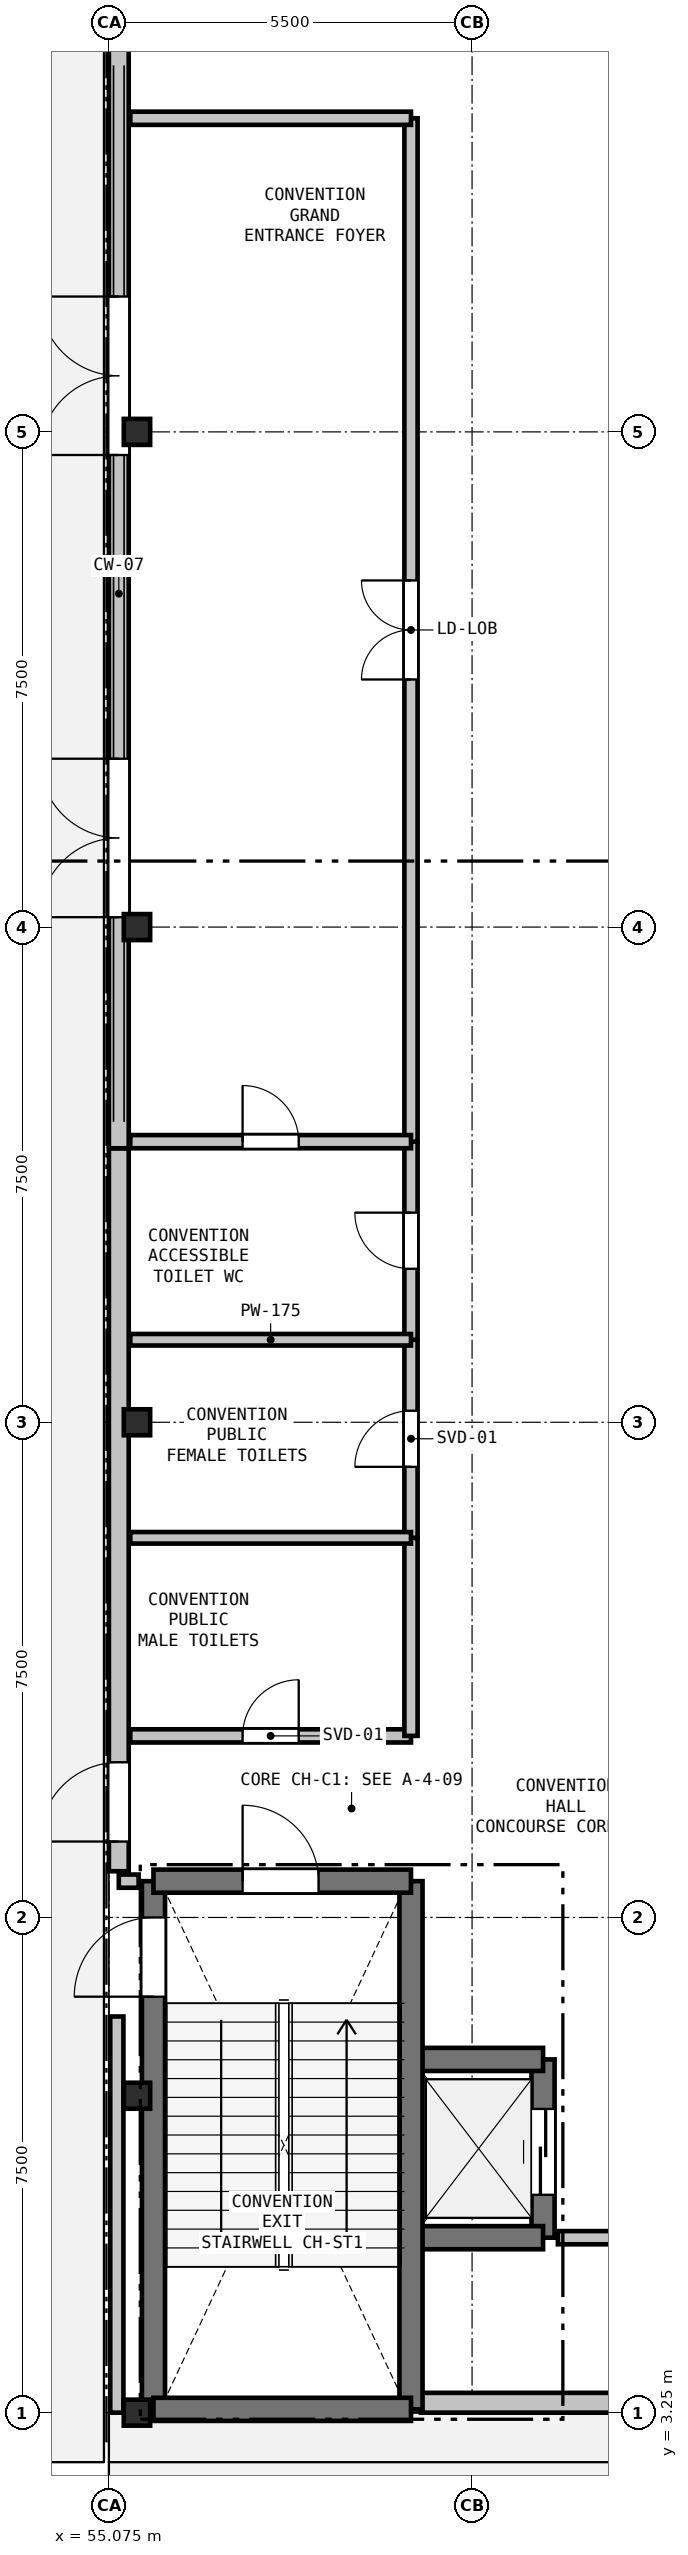
"""IFC4 building model, lengths in metres.
Left out: names, types, materials, properties, quantities, classifications, styles, units other than length and angle.
Written with IfcOpenShell. Run it as: python <this file> out.ifc"""

import sys

from ifc_helpers import new_model, si_unit, direction, frame, frame_2d, origin, origin_2d, place, context, subcontext, project, spatial, rectangle, i_section, extrude, element, fill, save


model = new_model("IFC4")
c1 = context("Model", 3, precision=1e-05, world=origin(), true_north=direction((0.0, 1.0)))
c2 = subcontext(c1, "Body", "Model", "MODEL_VIEW")
j1 = project(units=[si_unit("LENGTHUNIT", "METRE"), si_unit("PLANEANGLEUNIT", "RADIAN")], contexts=[c1])
p1 = place(None, origin())
s1 = spatial("IfcSite", under=j1, at=p1, CompositionType="ELEMENT")
p2 = place(p1, origin())
s2 = spatial("IfcBuilding", under=s1, at=p2, CompositionType="ELEMENT")
p3 = place(p2, origin())
s3 = spatial("IfcBuildingStorey", under=s2, at=p3, CompositionType="ELEMENT", Elevation=0.0)
for number, where, z_axis, x_axis in (
    (1, (55.5, 3.25, 0.0), (0.0, 0.0, 1.0), (1.0, 0.0, 0.0)),
    (2, (55.5, 8.05, 0.0), (0.0, 0.0, 1.0), (1.0, 0.0, 0.0)),
    (3, (55.5, 18.25, 0.0), (0.0, 0.0, 1.0), (1.0, 0.0, 0.0)),
    (4, (55.5, 25.75, 0.0), (0.0, 0.0, 1.0), (1.0, 0.0, 0.0)),
    (5, (55.5, 33.25, 0.0), (0.0, 0.0, 1.0), (1.0, 0.0, 0.0)),
):
    element("IfcColumn", number, at=place(p3, frame(where, z_axis=z_axis, x_axis=x_axis)), inside=s3, PredefinedType="COLUMN", context=c2, shape_type="SweptSolid", body=[
        extrude(i_section(OverallWidth=0.399, OverallDepth=0.394, WebThickness=0.023, FlangeThickness=0.037, at=origin_2d()), origin(), (0.0, 0.0, 1.0), 5.1),
    ])
p4 = place(p3, frame((55.195, 3.25, 0.0), z_axis=(0.0, 0.0, 1.0), x_axis=(0.0, 1.0, 0.0)))
e6 = element("IfcWall", 6, at=p4, inside=s3, PredefinedType="PARAPET", context=c2, shape_type="SweptSolid", body=[
    extrude(rectangle(XDim=6.0, YDim=0.2, at=frame_2d((3.0, 0.0))), origin(), (0.0, 0.0, 1.0), 4.39),
])
p5 = place(p3, frame((55.225, 11.45, 0.0), z_axis=(0.0, 0.0, 1.0), x_axis=(0.0, 1.0, 0.0)))
e7 = element("IfcWall", 7, at=p5, inside=s3, PredefinedType="SOLIDWALL", context=c2, shape_type="SweptSolid", body=[
    extrude(rectangle(XDim=10.95, YDim=0.3, at=frame_2d((5.475, 0.0))), origin(), (0.0, 0.0, 1.0), 4.39),
])
p6 = place(p5, frame((0.45, 0.0, 0.0)))
e8 = element("IfcOpeningElement", 8, at=p6, cuts=e7, PredefinedType="OPENING", context=c2, shape_type="SweptSolid", body=[
    extrude(rectangle(XDim=1.2, YDim=2.2, at=frame_2d((0.6, 1.1))), frame((0.0, 0.16, 0.0), z_axis=(0.0, -1.0, 0.0), x_axis=(1.0, 0.0, 0.0)), (0.0, 0.0, 1.0), 0.32),
])
p7 = place(p3, frame((76.925, 3.4, 0.0), z_axis=(0.0, 0.0, 1.0), x_axis=(-1.0, 0.0, 0.0)))
e9 = element("IfcWall", 9, at=p7, inside=s3, PredefinedType="SOLIDWALL", context=c2, shape_type="SweptSolid", body=[
    extrude(rectangle(XDim=17.125, YDim=0.3, at=frame_2d((8.562, 0.0))), origin(), (0.0, 0.0, 1.0), 3.914),
])
p8 = place(p7, frame((1.5, 0.0, 0.0)))
e10 = element("IfcOpeningElement", 10, at=p8, cuts=e9, PredefinedType="OPENING", context=c2, shape_type="SweptSolid", body=[
    extrude(rectangle(XDim=4.0, YDim=3.6, at=frame_2d((2.0, 1.8))), frame((0.0, 0.16, 0.0), z_axis=(0.0, -1.0, 0.0), x_axis=(1.0, 0.0, 0.0)), (0.0, 0.0, 1.0), 0.32),
])
p9 = place(p7, frame((7.0, 0.0, 0.0)))
e11 = element("IfcOpeningElement", 11, at=p9, cuts=e9, PredefinedType="OPENING", context=c2, shape_type="SweptSolid", body=[
    extrude(rectangle(XDim=4.0, YDim=3.6, at=frame_2d((2.0, 1.8))), frame((0.0, 0.16, 0.0), z_axis=(0.0, -1.0, 0.0), x_axis=(1.0, 0.0, 0.0)), (0.0, 0.0, 1.0), 0.32),
])
p10 = place(p3, frame((55.225, 22.4, 0.0), z_axis=(0.0, 0.0, 1.0), x_axis=(0.0, 1.0, 0.0)))
e12 = element("IfcWall", 12, at=p10, inside=s3, PredefinedType="SOLIDWALL", context=c2, shape_type="SweptSolid", body=[
    extrude(rectangle(XDim=16.8, YDim=0.3, at=frame_2d((8.4, 0.0))), origin(), (0.0, 0.0, 1.0), 2.6),
])
p11 = place(p10, frame((3.5, 0.0, 0.0)))
e13 = element("IfcOpeningElement", 13, at=p11, cuts=e12, PredefinedType="OPENING", context=c2, shape_type="SweptSolid", body=[
    extrude(rectangle(XDim=2.4, YDim=2.4, at=frame_2d((1.2, 1.2))), frame((0.0, 0.16, 0.0), z_axis=(0.0, -1.0, 0.0), x_axis=(1.0, 0.0, 0.0)), (0.0, 0.0, 1.0), 0.32),
])
p12 = place(p10, frame((10.5, 0.0, 0.0)))
e14 = element("IfcOpeningElement", 14, at=p12, cuts=e12, PredefinedType="OPENING", context=c2, shape_type="SweptSolid", body=[
    extrude(rectangle(XDim=2.4, YDim=2.4, at=frame_2d((1.2, 1.2))), frame((0.0, 0.16, 0.0), z_axis=(0.0, -1.0, 0.0), x_axis=(1.0, 0.0, 0.0)), (0.0, 0.0, 1.0), 0.32),
])
p13 = place(p3, frame((61.65, 5.9, 0.0), z_axis=(0.0, 0.0, 1.0), x_axis=(0.0, 1.0, 0.0)))
e15 = element("IfcWall", 15, at=p13, inside=s3, PredefinedType="SHEAR", context=c2, shape_type="SweptSolid", body=[
    extrude(rectangle(XDim=2.7, YDim=0.35, at=frame_2d((1.35, 0.0))), origin(), (0.0, 0.0, 1.0), 4.8),
])
p14 = place(p13, frame((0.65, 0.0, 0.0)))
e16 = element("IfcOpeningElement", 16, at=p14, cuts=e15, PredefinedType="OPENING", context=c2, shape_type="SweptSolid", body=[
    extrude(rectangle(XDim=1.3, YDim=2.2, at=frame_2d((0.65, 1.1))), frame((0.0, 0.185, 0.0), z_axis=(0.0, -1.0, 0.0), x_axis=(1.0, 0.0, 0.0)), (0.0, 0.0, 1.0), 0.37),
])
for number, where, z_axis, x_axis in (
    (17, (59.65, 8.6, 0.0), (0.0, 0.0, 1.0), (1.0, 0.0, 0.0)),
    (18, (59.65, 5.9, 0.0), (0.0, 0.0, 1.0), (1.0, 0.0, 0.0)),
):
    element("IfcWall", number, at=place(p3, frame(where, z_axis=z_axis, x_axis=x_axis)), inside=s3, PredefinedType="SHEAR", context=c2, shape_type="SweptSolid", body=[
        extrude(rectangle(XDim=2.0, YDim=0.35, at=frame_2d((1.0, 0.0))), origin(), (0.0, 0.0, 1.0), 4.8),
    ])
p15 = place(p3, frame((59.65, 11.3, 0.0), z_axis=(0.0, 0.0, 1.0), x_axis=(0.0, -1.0, 0.0)))
e19 = element("IfcWall", 19, at=p15, inside=s3, PredefinedType="SHEAR", context=c2, shape_type="SweptSolid", body=[
    extrude(rectangle(XDim=8.0, YDim=0.35, at=frame_2d((4.0, 0.0))), origin(), (0.0, 0.0, 1.0), 4.8),
])
p16 = place(p3, frame((55.75, 3.3, 0.0), z_axis=(0.0, 0.0, 1.0), x_axis=(0.0, 1.0, 0.0)))
e20 = element("IfcWall", 20, at=p16, inside=s3, PredefinedType="SHEAR", context=c2, shape_type="SweptSolid", body=[
    extrude(rectangle(XDim=8.0, YDim=0.35, at=frame_2d((4.0, 0.0))), origin(), (0.0, 0.0, 1.0), 4.8),
])
p17 = place(p16, frame((6.25, 0.0, 0.0)))
e21 = element("IfcOpeningElement", 21, at=p17, cuts=e20, PredefinedType="OPENING", context=c2, shape_type="SweptSolid", body=[
    extrude(rectangle(XDim=1.2, YDim=2.2, at=frame_2d((0.6, 1.1))), frame((0.0, 0.185, 0.0), z_axis=(0.0, -1.0, 0.0), x_axis=(1.0, 0.0, 0.0)), (0.0, 0.0, 1.0), 0.37),
])
p18 = place(p3, frame((55.75, 11.3, 0.0), z_axis=(0.0, 0.0, 1.0), x_axis=(1.0, 0.0, 0.0)))
e22 = element("IfcWall", 22, at=p18, inside=s3, PredefinedType="SHEAR", context=c2, shape_type="SweptSolid", body=[
    extrude(rectangle(XDim=3.9, YDim=0.35, at=frame_2d((1.95, 0.0))), origin(), (0.0, 0.0, 1.0), 4.8),
])
p19 = place(p18, frame((1.35, 0.0, 0.0)))
e23 = element("IfcOpeningElement", 23, at=p19, cuts=e22, PredefinedType="OPENING", context=c2, shape_type="SweptSolid", body=[
    extrude(rectangle(XDim=1.15, YDim=2.15, at=frame_2d((0.575, 1.075))), frame((0.0, 0.185, 0.0), z_axis=(0.0, -1.0, 0.0), x_axis=(1.0, 0.0, 0.0)), (0.0, 0.0, 1.0), 0.37),
])
p20 = place(p3, frame((55.75, 3.3, 0.0), z_axis=(0.0, 0.0, 1.0), x_axis=(1.0, 0.0, 0.0)))
e24 = element("IfcWall", 24, at=p20, inside=s3, PredefinedType="SHEAR", context=c2, shape_type="SweptSolid", body=[
    extrude(rectangle(XDim=3.9, YDim=0.35, at=frame_2d((1.95, 0.0))), origin(), (0.0, 0.0, 1.0), 4.8),
])
p21 = place(p3, frame((55.525, 11.3, 0.0), z_axis=(0.0, 0.0, 1.0), x_axis=(-1.0, 0.0, 0.0)))
e25 = element("IfcWall", 25, at=p21, inside=s3, PredefinedType="PARTITIONING", context=c2, shape_type="SweptSolid", body=[
    extrude(rectangle(XDim=0.3, YDim=0.2, at=frame_2d((0.15, 0.0))), origin(), (0.0, 0.0, 1.0), 4.39),
])
p22 = place(p3, frame((55.399, 13.5, 0.0), z_axis=(0.0, 0.0, 1.0), x_axis=(1.0, 0.0, 0.0)))
e26 = element("IfcWall", 26, at=p22, inside=s3, PredefinedType="PARTITIONING", context=c2, shape_type="SweptSolid", body=[
    extrude(rectangle(XDim=4.251, YDim=0.2, at=frame_2d((2.125, 0.0))), origin(), (0.0, 0.0, 1.0), 4.39),
])
p23 = place(p22, frame((1.7, 0.0, 0.0)))
e27 = element("IfcOpeningElement", 27, at=p23, cuts=e26, PredefinedType="OPENING", context=c2, shape_type="SweptSolid", body=[
    extrude(rectangle(XDim=0.85, YDim=2.1, at=frame_2d((0.425, 1.05))), frame((0.0, 0.11, 0.0), z_axis=(0.0, -1.0, 0.0), x_axis=(1.0, 0.0, 0.0)), (0.0, 0.0, 1.0), 0.22),
])
p24 = place(p3, frame((59.65, 13.5, 0.0), z_axis=(0.0, 0.0, 1.0), x_axis=(0.0, 1.0, 0.0)))
e28 = element("IfcWall", 28, at=p24, inside=s3, PredefinedType="PARTITIONING", context=c2, shape_type="SweptSolid", body=[
    extrude(rectangle(XDim=3.0, YDim=0.2, at=frame_2d((1.5, 0.0))), origin(), (0.0, 0.0, 1.0), 4.8),
])
p25 = place(p3, frame((59.65, 16.5, 0.0), z_axis=(0.0, 0.0, 1.0), x_axis=(0.0, 1.0, 0.0)))
e29 = element("IfcWall", 29, at=p25, inside=s3, PredefinedType="PARTITIONING", context=c2, shape_type="SweptSolid", body=[
    extrude(rectangle(XDim=3.0, YDim=0.2, at=frame_2d((1.5, 0.0))), origin(), (0.0, 0.0, 1.0), 3.914),
])
p26 = place(p25, frame((1.075, 0.0, 0.0)))
e30 = element("IfcOpeningElement", 30, at=p26, cuts=e29, PredefinedType="OPENING", context=c2, shape_type="SweptSolid", body=[
    extrude(rectangle(XDim=0.85, YDim=2.1, at=frame_2d((0.425, 1.05))), frame((0.0, 0.11, 0.0), z_axis=(0.0, -1.0, 0.0), x_axis=(1.0, 0.0, 0.0)), (0.0, 0.0, 1.0), 0.22),
])
p27 = place(p3, frame((59.65, 19.5, 0.0), z_axis=(0.0, 0.0, 1.0), x_axis=(0.0, 1.0, 0.0)))
e31 = element("IfcWall", 31, at=p27, inside=s3, PredefinedType="PARTITIONING", context=c2, shape_type="SweptSolid", body=[
    extrude(rectangle(XDim=3.0, YDim=0.2, at=frame_2d((1.5, 0.0))), origin(), (0.0, 0.0, 1.0), 4.8),
])
p28 = place(p27, frame((1.075, 0.0, 0.0)))
e32 = element("IfcOpeningElement", 32, at=p28, cuts=e31, PredefinedType="OPENING", context=c2, shape_type="SweptSolid", body=[
    extrude(rectangle(XDim=0.85, YDim=2.1, at=frame_2d((0.425, 1.05))), frame((0.0, 0.11, 0.0), z_axis=(0.0, -1.0, 0.0), x_axis=(1.0, 0.0, 0.0)), (0.0, 0.0, 1.0), 0.22),
])
p29 = place(p3, frame((59.65, 22.5, 0.0), z_axis=(0.0, 0.0, 1.0), x_axis=(0.0, 1.0, 0.0)))
e33 = element("IfcWall", 33, at=p29, inside=s3, PredefinedType="PARTITIONING", context=c2, shape_type="SweptSolid", body=[
    extrude(rectangle(XDim=15.5, YDim=0.2, at=frame_2d((7.75, 0.0))), origin(), (0.0, 0.0, 1.0), 3.914),
])
p30 = place(p29, frame((7.0, 0.0, 0.0)))
e34 = element("IfcOpeningElement", 34, at=p30, cuts=e33, PredefinedType="OPENING", context=c2, shape_type="SweptSolid", body=[
    extrude(rectangle(XDim=1.5, YDim=2.2, at=frame_2d((0.75, 1.1))), frame((0.0, 0.11, 0.0), z_axis=(0.0, -1.0, 0.0), x_axis=(1.0, 0.0, 0.0)), (0.0, 0.0, 1.0), 0.22),
])
p31 = place(p3, frame((59.65, 38.0, 0.0), z_axis=(0.0, 0.0, 1.0), x_axis=(-1.0, 0.0, 0.0)))
e35 = element("IfcWall", 35, at=p31, inside=s3, PredefinedType="PARTITIONING", context=c2, shape_type="SweptSolid", body=[
    extrude(rectangle(XDim=4.251, YDim=0.2, at=frame_2d((2.125, 0.0))), origin(), (0.0, 0.0, 1.0), 4.39),
])
p32 = place(p3, frame((63.85, 5.9, 0.0), z_axis=(0.0, 0.0, 1.0), x_axis=(-1.0, 0.0, 0.0)))
e36 = element("IfcWall", 36, at=p32, inside=s3, PredefinedType="PARTITIONING", context=c2, shape_type="SweptSolid", body=[
    extrude(rectangle(XDim=1.975, YDim=0.2, at=frame_2d((0.988, 0.0))), origin(), (0.0, 0.0, 1.0), 4.356),
])
for number, where, z_axis, x_axis in (
    (37, (55.399, 16.5, 0.0), (0.0, 0.0, 1.0), (1.0, 0.0, 0.0)),
    (38, (55.399, 19.5, 0.0), (0.0, 0.0, 1.0), (1.0, 0.0, 0.0)),
):
    element("IfcWall", number, at=place(p3, frame(where, z_axis=z_axis, x_axis=x_axis)), inside=s3, PredefinedType="PLUMBINGWALL", context=c2, shape_type="SweptSolid", body=[
        extrude(rectangle(XDim=4.251, YDim=0.175, at=frame_2d((2.125, 0.0))), origin(), (0.0, 0.0, 1.0), 4.39),
    ])
p33 = place(p3, frame((55.399, 22.5, 0.0), z_axis=(0.0, 0.0, 1.0), x_axis=(1.0, 0.0, 0.0)))
e39 = element("IfcWall", 39, at=p33, inside=s3, PredefinedType="PARTITIONING", context=c2, shape_type="SweptSolid", body=[
    extrude(rectangle(XDim=4.251, YDim=0.2, at=frame_2d((2.125, 0.0))), origin(), (0.0, 0.0, 1.0), 4.39),
])
p34 = place(p33, frame((1.7, 0.0, 0.0)))
e40 = element("IfcOpeningElement", 40, at=p34, cuts=e39, PredefinedType="OPENING", context=c2, shape_type="SweptSolid", body=[
    extrude(rectangle(XDim=0.85, YDim=2.1, at=frame_2d((0.425, 1.05))), frame((0.0, 0.11, 0.0), z_axis=(0.0, -1.0, 0.0), x_axis=(1.0, 0.0, 0.0)), (0.0, 0.0, 1.0), 0.22),
])
p35 = place(p11, origin())
e41 = element("IfcDoor", 41, at=p35, inside=s3, OperationType="DOUBLE_DOOR_SINGLE_SWING", PredefinedType="DOOR", context=c2, shape_type="SweptSolid", body=[
    extrude(rectangle(XDim=2.4, YDim=2.4, at=frame_2d((1.2, 1.2))), frame((0.0, 0.025, 0.0), z_axis=(0.0, -1.0, 0.0), x_axis=(1.0, 0.0, 0.0)), (0.0, 0.0, 1.0), 0.05),
])
fill(e13, e41)
p36 = place(p12, origin())
e42 = element("IfcDoor", 42, at=p36, inside=s3, OperationType="DOUBLE_DOOR_SINGLE_SWING", PredefinedType="DOOR", context=c2, shape_type="SweptSolid", body=[
    extrude(rectangle(XDim=2.4, YDim=2.4, at=frame_2d((1.2, 1.2))), frame((0.0, 0.025, 0.0), z_axis=(0.0, -1.0, 0.0), x_axis=(1.0, 0.0, 0.0)), (0.0, 0.0, 1.0), 0.05),
])
fill(e14, e42)
p37 = place(p6, origin())
e43 = element("IfcDoor", 43, at=p37, inside=s3, OperationType="SINGLE_SWING_LEFT", PredefinedType="DOOR", context=c2, shape_type="SweptSolid", body=[
    extrude(rectangle(XDim=1.2, YDim=2.2, at=frame_2d((0.6, 1.1))), frame((0.0, 0.025, 0.0), z_axis=(0.0, -1.0, 0.0), x_axis=(1.0, 0.0, 0.0)), (0.0, 0.0, 1.0), 0.05),
])
fill(e8, e43)
p38 = place(p14, origin())
e44 = element("IfcDoor", 44, at=p38, inside=s3, OperationType="SLIDING_TO_LEFT", PredefinedType="DOOR", context=c2, shape_type="SweptSolid", body=[
    extrude(rectangle(XDim=1.3, YDim=2.2, at=frame_2d((0.65, 1.1))), frame((0.0, 0.025, 0.0), z_axis=(0.0, -1.0, 0.0), x_axis=(1.0, 0.0, 0.0)), (0.0, 0.0, 1.0), 0.05),
])
fill(e16, e44)
p39 = place(p19, origin())
e45 = element("IfcDoor", 45, at=p39, inside=s3, OperationType="SINGLE_SWING_LEFT", PredefinedType="DOOR", context=c2, shape_type="SweptSolid", body=[
    extrude(rectangle(XDim=1.15, YDim=2.15, at=frame_2d((0.575, 1.075))), frame((0.0, 0.025, 0.0), z_axis=(0.0, -1.0, 0.0), x_axis=(1.0, 0.0, 0.0)), (0.0, 0.0, 1.0), 0.05),
])
fill(e23, e45)
p40 = place(p17, origin())
e46 = element("IfcDoor", 46, at=p40, inside=s3, OperationType="SINGLE_SWING_LEFT", PredefinedType="DOOR", context=c2, shape_type="SweptSolid", body=[
    extrude(rectangle(XDim=1.2, YDim=2.2, at=frame_2d((0.6, 1.1))), frame((0.0, 0.025, 0.0), z_axis=(0.0, -1.0, 0.0), x_axis=(1.0, 0.0, 0.0)), (0.0, 0.0, 1.0), 0.05),
])
fill(e21, e46)
p41 = place(p23, origin())
e47 = element("IfcDoor", 47, at=p41, inside=s3, OperationType="SINGLE_SWING_RIGHT", PredefinedType="DOOR", context=c2, shape_type="SweptSolid", body=[
    extrude(rectangle(XDim=0.85, YDim=2.1, at=frame_2d((0.425, 1.05))), frame((0.0, 0.025, 0.0), z_axis=(0.0, -1.0, 0.0), x_axis=(1.0, 0.0, 0.0)), (0.0, 0.0, 1.0), 0.05),
])
fill(e27, e47)
p42 = place(p26, origin())
e48 = element("IfcDoor", 48, at=p42, inside=s3, OperationType="SINGLE_SWING_LEFT", PredefinedType="DOOR", context=c2, shape_type="SweptSolid", body=[
    extrude(rectangle(XDim=0.85, YDim=2.1, at=frame_2d((0.425, 1.05))), frame((0.0, 0.025, 0.0), z_axis=(0.0, -1.0, 0.0), x_axis=(1.0, 0.0, 0.0)), (0.0, 0.0, 1.0), 0.05),
])
fill(e30, e48)
p43 = place(p28, origin())
e49 = element("IfcDoor", 49, at=p43, inside=s3, OperationType="SINGLE_SWING_RIGHT", PredefinedType="DOOR", context=c2, shape_type="SweptSolid", body=[
    extrude(rectangle(XDim=0.85, YDim=2.1, at=frame_2d((0.425, 1.05))), frame((0.0, 0.025, 0.0), z_axis=(0.0, -1.0, 0.0), x_axis=(1.0, 0.0, 0.0)), (0.0, 0.0, 1.0), 0.05),
])
fill(e32, e49)
p44 = place(p30, origin())
e50 = element("IfcDoor", 50, at=p44, inside=s3, OperationType="DOUBLE_DOOR_SINGLE_SWING", PredefinedType="DOOR", context=c2, shape_type="SweptSolid", body=[
    extrude(rectangle(XDim=1.5, YDim=2.2, at=frame_2d((0.75, 1.1))), frame((0.0, 0.025, 0.0), z_axis=(0.0, -1.0, 0.0), x_axis=(1.0, 0.0, 0.0)), (0.0, 0.0, 1.0), 0.05),
])
fill(e34, e50)
p45 = place(p34, origin())
e51 = element("IfcDoor", 51, at=p45, inside=s3, OperationType="SINGLE_SWING_LEFT", PredefinedType="DOOR", context=c2, shape_type="SweptSolid", body=[
    extrude(rectangle(XDim=0.85, YDim=2.1, at=frame_2d((0.425, 1.05))), frame((0.0, 0.025, 0.0), z_axis=(0.0, -1.0, 0.0), x_axis=(1.0, 0.0, 0.0)), (0.0, 0.0, 1.0), 0.05),
])
fill(e40, e51)
save(model, sys.argv[1])
